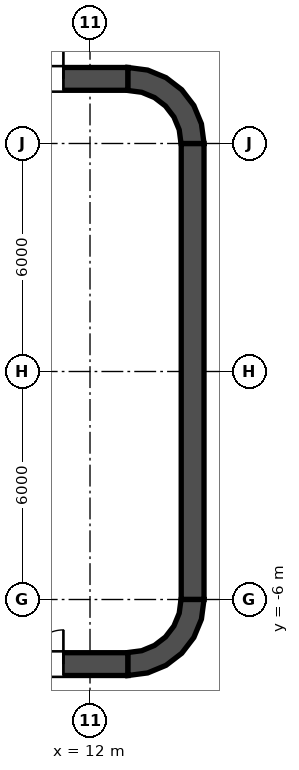
"""IFC4 building model, lengths in metres.
Left out: names, types, materials, properties, quantities, classifications, styles, units other than length and angle.
Written with IfcOpenShell. Run it as: python <this file> out.ifc"""

import sys

from ifc_helpers import new_model, si_unit, direction, frame, frame_2d, origin, place, context, subcontext, project, spatial, polyline, rectangle, outline, extrude, element, fill, save


model = new_model("IFC4")
c1 = context("Model", 3, precision=1e-05, world=origin(), true_north=direction((0.0, 1.0)))
c2 = subcontext(c1, "Body", "Model", "MODEL_VIEW")
j1 = project(units=[si_unit("LENGTHUNIT", "METRE"), si_unit("PLANEANGLEUNIT", "RADIAN")], contexts=[c1])
p1 = place(None, origin())
s1 = spatial("IfcSite", under=j1, at=p1, CompositionType="ELEMENT")
p2 = place(p1, origin())
s2 = spatial("IfcBuilding", under=s1, at=p2, CompositionType="ELEMENT")
p3 = place(p2, frame((0.0, 0.0, -5.0)))
s3 = spatial("IfcBuildingStorey", under=s2, at=p3, CompositionType="ELEMENT", Elevation=-5.0)
p4 = place(p3, frame((-13.0, 7.7, -0.3), z_axis=(0.0, 0.0, 1.0), x_axis=(1.0, 0.0, 0.0)))
e1 = element("IfcWall", 1, at=p4, inside=s3, PredefinedType="SHEAR", context=c2, shape_type="SweptSolid", body=[
    extrude(rectangle(XDim=26.0, YDim=0.6, at=frame_2d((13.0, 0.0))), origin(), (0.0, 0.0, 1.0), 5.3),
])
p5 = place(p4, frame((1.7, 0.0, 0.0)))
e2 = element("IfcOpeningElement", 2, at=p5, cuts=e1, PredefinedType="OPENING", context=c2, shape_type="SweptSolid", body=[
    extrude(rectangle(XDim=1.8, YDim=2.1, at=frame_2d((0.9, 1.05))), frame((0.0, 0.3, 0.0), z_axis=(0.0, -1.0, 0.0), x_axis=(1.0, 0.0, 0.0)), (0.0, 0.0, 1.0), 0.6),
])
p6 = place(p4, frame((22.5, 0.0, 0.0)))
e3 = element("IfcOpeningElement", 3, at=p6, cuts=e1, PredefinedType="OPENING", context=c2, shape_type="SweptSolid", body=[
    extrude(rectangle(XDim=1.8, YDim=2.1, at=frame_2d((0.9, 1.05))), frame((0.0, 0.3, 0.0), z_axis=(0.0, -1.0, 0.0), x_axis=(1.0, 0.0, 0.0)), (0.0, 0.0, 1.0), 0.6),
])
p7 = place(p3, frame((-13.0, -7.7, -0.3), z_axis=(0.0, 0.0, 1.0), x_axis=(1.0, 0.0, 0.0)))
e4 = element("IfcWall", 4, at=p7, inside=s3, PredefinedType="SHEAR", context=c2, shape_type="SweptSolid", body=[
    extrude(rectangle(XDim=26.0, YDim=0.6, at=frame_2d((13.0, 0.0))), origin(), (0.0, 0.0, 1.0), 5.3),
])
p8 = place(p7, frame((1.7, 0.0, 0.0)))
e5 = element("IfcOpeningElement", 5, at=p8, cuts=e4, PredefinedType="OPENING", context=c2, shape_type="SweptSolid", body=[
    extrude(rectangle(XDim=1.8, YDim=2.1, at=frame_2d((0.9, 1.05))), frame((0.0, 0.3, 0.0), z_axis=(0.0, -1.0, 0.0), x_axis=(1.0, 0.0, 0.0)), (0.0, 0.0, 1.0), 0.6),
])
p9 = place(p7, frame((22.5, 0.0, 0.0)))
e6 = element("IfcOpeningElement", 6, at=p9, cuts=e4, PredefinedType="OPENING", context=c2, shape_type="SweptSolid", body=[
    extrude(rectangle(XDim=1.8, YDim=2.1, at=frame_2d((0.9, 1.05))), frame((0.0, 0.3, 0.0), z_axis=(0.0, -1.0, 0.0), x_axis=(1.0, 0.0, 0.0)), (0.0, 0.0, 1.0), 0.6),
])
p10 = place(p3, frame((14.7, -6.0, -0.3), z_axis=(0.0, 0.0, 1.0), x_axis=(0.0, 1.0, 0.0)))
e7 = element("IfcWall", 7, at=p10, inside=s3, PredefinedType="SHEAR", context=c2, shape_type="SweptSolid", body=[
    extrude(rectangle(XDim=12.0, YDim=0.6, at=frame_2d((6.0, 0.0))), origin(), (0.0, 0.0, 1.0), 5.3),
])
p11 = place(p3, frame((0.0, 0.0, -0.3)))
e8 = element("IfcWall", 8, at=p11, inside=s3, PredefinedType="SHEAR", context=c2, shape_type="SweptSolid", body=[
    extrude(outline(polyline([(13.0, 8.0), (13.0, 7.395), (13.361, 7.347), (13.698, 7.208), (13.986, 6.986), (14.208, 6.698), (14.347, 6.361), (14.395, 6.0), (15.0, 6.0), (14.932, 6.518), (14.732, 7.0), (14.414, 7.414), (14.0, 7.732), (13.518, 7.932), (13.0, 8.0)])), origin(), (0.0, 0.0, 1.0), 5.3),
])
e9 = element("IfcWall", 9, at=p11, inside=s3, PredefinedType="SHEAR", context=c2, shape_type="SweptSolid", body=[
    extrude(outline(polyline([(15.0, -6.0), (14.395, -6.0), (14.347, -6.361), (14.208, -6.698), (13.986, -6.986), (13.698, -7.208), (13.361, -7.347), (13.0, -7.395), (13.0, -8.0), (13.518, -7.932), (14.0, -7.732), (14.414, -7.414), (14.732, -7.0), (14.932, -6.518), (15.0, -6.0)])), origin(), (0.0, 0.0, 1.0), 5.3),
])
p12 = place(p3, frame((11.8, -7.4, 0.0), z_axis=(0.0, 0.0, 1.0), x_axis=(0.0, 1.0, 0.0)))
e10 = element("IfcWall", 10, at=p12, inside=s3, PredefinedType="SOLIDWALL", context=c2, shape_type="SweptSolid", body=[
    extrude(rectangle(XDim=14.8, YDim=0.4, at=frame_2d((7.4, 0.0))), origin(), (0.0, 0.0, 1.0), 4.7),
])
p13 = place(p12, frame((13.552, 0.0, 0.0)))
e11 = element("IfcOpeningElement", 11, at=p13, cuts=e10, PredefinedType="OPENING", context=c2, shape_type="SweptSolid", body=[
    extrude(rectangle(XDim=0.9, YDim=2.1, at=frame_2d((0.45, 1.05))), frame((0.0, 0.2, 0.0), z_axis=(0.0, -1.0, 0.0), x_axis=(1.0, 0.0, 0.0)), (0.0, 0.0, 1.0), 0.4),
])
p14 = place(p12, frame((0.347, 0.0, 0.0)))
e12 = element("IfcOpeningElement", 12, at=p14, cuts=e10, PredefinedType="OPENING", context=c2, shape_type="SweptSolid", body=[
    extrude(rectangle(XDim=0.9, YDim=2.1, at=frame_2d((0.45, 1.05))), frame((0.0, 0.2, 0.0), z_axis=(0.0, -1.0, 0.0), x_axis=(1.0, 0.0, 0.0)), (0.0, 0.0, 1.0), 0.4),
])
p15 = place(p3, origin())
e13 = element("IfcWall", 13, at=p15, inside=s3, PredefinedType="SOLIDWALL", context=c2, shape_type="SweptSolid", body=[
    extrude(outline(polyline([(12.0, -5.675), (12.0, -5.925), (14.15, -5.925), (14.4, -5.925), (14.4, -5.675), (14.4, -3.025), (14.4, -2.775), (14.4, -0.125), (14.4, 0.125), (14.4, 2.775), (14.4, 3.025), (14.4, 5.675), (14.4, 5.925), (14.15, 5.925), (12.0, 5.925), (12.0, 5.675), (14.15, 5.675), (14.15, 3.025), (12.0, 3.025), (12.0, 2.775), (14.15, 2.775), (14.15, 0.125), (12.0, 0.125), (12.0, -0.125), (14.15, -0.125), (14.15, -2.775), (12.0, -2.775), (12.0, -3.025), (14.15, -3.025), (14.15, -5.675), (12.0, -5.675)])), origin(), (0.0, 0.0, 1.0), 4.7),
])
p16 = place(p13, origin())
e14 = element("IfcDoor", 14, at=p16, inside=s3, OperationType="SINGLE_SWING_RIGHT", PredefinedType="DOOR", context=c2, shape_type="SweptSolid", body=[
    extrude(rectangle(XDim=0.9, YDim=2.1, at=frame_2d((0.45, 1.05))), frame((0.0, 0.025, 0.0), z_axis=(0.0, -1.0, 0.0), x_axis=(1.0, 0.0, 0.0)), (0.0, 0.0, 1.0), 0.05),
])
fill(e11, e14)
p17 = place(p14, origin())
e15 = element("IfcDoor", 15, at=p17, inside=s3, OperationType="SINGLE_SWING_RIGHT", PredefinedType="DOOR", context=c2, shape_type="SweptSolid", body=[
    extrude(rectangle(XDim=0.9, YDim=2.1, at=frame_2d((0.45, 1.05))), frame((0.0, 0.025, 0.0), z_axis=(0.0, -1.0, 0.0), x_axis=(1.0, 0.0, 0.0)), (0.0, 0.0, 1.0), 0.05),
])
fill(e12, e15)
p18 = place(p6, origin())
e16 = element("IfcDoor", 16, at=p18, inside=s3, OperationType="DOUBLE_DOOR_SINGLE_SWING", PredefinedType="DOOR", context=c2, shape_type="SweptSolid", body=[
    extrude(rectangle(XDim=1.8, YDim=2.1, at=frame_2d((0.9, 1.05))), frame((0.0, 0.025, 0.0), z_axis=(0.0, -1.0, 0.0), x_axis=(1.0, 0.0, 0.0)), (0.0, 0.0, 1.0), 0.05),
])
fill(e3, e16)
p19 = place(p9, origin())
e17 = element("IfcDoor", 17, at=p19, inside=s3, OperationType="DOUBLE_DOOR_SINGLE_SWING", PredefinedType="DOOR", context=c2, shape_type="SweptSolid", body=[
    extrude(rectangle(XDim=1.8, YDim=2.1, at=frame_2d((0.9, 1.05))), frame((0.0, 0.025, 0.0), z_axis=(0.0, -1.0, 0.0), x_axis=(1.0, 0.0, 0.0)), (0.0, 0.0, 1.0), 0.05),
])
fill(e6, e17)
save(model, sys.argv[1])
